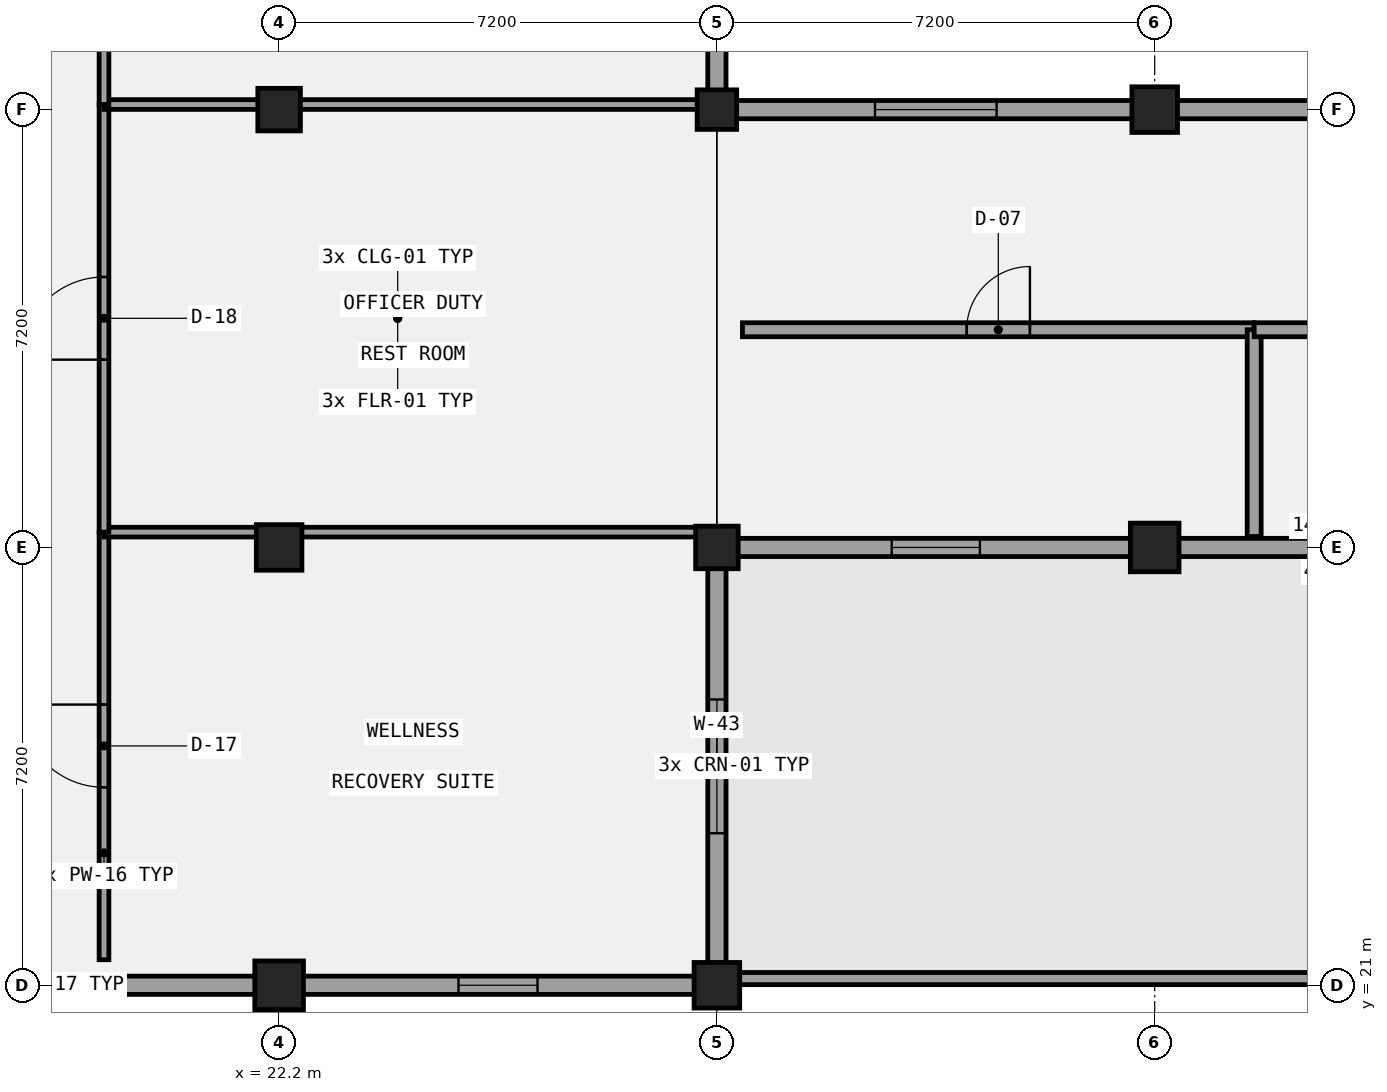
"""IFC4 building model, lengths in metres.
Left out: names, types, materials, properties, quantities, classifications, styles, units other than length and angle.
Written with IfcOpenShell. Run it as: python <this file> out.ifc"""

import sys

from ifc_helpers import new_model, si_unit, direction, frame, frame_2d, origin, origin_2d, place, context, subcontext, project, spatial, rectangle, circle, extrude, element, fill, save


model = new_model("IFC4")
c1 = context("Model", 3, precision=1e-05, world=origin(), true_north=direction((0.0, 1.0)))
c2 = subcontext(c1, "Body", "Model", "MODEL_VIEW")
j1 = project(units=[si_unit("LENGTHUNIT", "METRE"), si_unit("PLANEANGLEUNIT", "RADIAN")], contexts=[c1])
p1 = place(None, origin())
s1 = spatial("IfcSite", under=j1, at=p1, CompositionType="ELEMENT")
p2 = place(p1, origin())
s2 = spatial("IfcBuilding", under=s1, at=p2, CompositionType="ELEMENT")
p3 = place(p2, frame((0.0, 0.0, 5.4)))
s3 = spatial("IfcBuildingStorey", under=s2, at=p3, CompositionType="ELEMENT", Elevation=5.4)
p4 = place(p3, frame((22.2, 21.0, 0.0), z_axis=(0.0, 0.0, 1.0), x_axis=(1.0, 0.0, 0.0)))
e1 = element("IfcColumn", 1, at=p4, inside=s3, PredefinedType="COLUMN", context=c2, shape_type="SweptSolid", body=[
    extrude(rectangle(XDim=0.8, YDim=0.8, at=origin_2d()), origin(), (0.0, 0.0, 1.0), 4.2),
])
p5 = place(p3, frame((22.2, 28.2, 0.0), z_axis=(0.0, 0.0, 1.0), x_axis=(1.0, 0.0, 0.0)))
e2 = element("IfcColumn", 2, at=p5, inside=s3, PredefinedType="COLUMN", context=c2, shape_type="SweptSolid", body=[
    extrude(rectangle(XDim=0.75, YDim=0.75, at=origin_2d()), origin(), (0.0, 0.0, 1.0), 4.2),
])
p6 = place(p3, frame((22.2, 35.4, 0.0), z_axis=(0.0, 0.0, 1.0), x_axis=(1.0, 0.0, 0.0)))
e3 = element("IfcColumn", 3, at=p6, inside=s3, PredefinedType="COLUMN", context=c2, shape_type="SweptSolid", body=[
    extrude(rectangle(XDim=0.7, YDim=0.7, at=origin_2d()), origin(), (0.0, 0.0, 1.0), 4.2),
])
p7 = place(p3, frame((29.4, 21.0, 0.0), z_axis=(0.0, 0.0, 1.0), x_axis=(1.0, 0.0, 0.0)))
e4 = element("IfcColumn", 4, at=p7, inside=s3, PredefinedType="COLUMN", context=c2, shape_type="SweptSolid", body=[
    extrude(rectangle(XDim=0.75, YDim=0.75, at=origin_2d()), origin(), (0.0, 0.0, 1.0), 4.2),
])
p8 = place(p3, frame((29.4, 28.2, 0.0), z_axis=(0.0, 0.0, 1.0), x_axis=(1.0, 0.0, 0.0)))
e5 = element("IfcColumn", 5, at=p8, inside=s3, PredefinedType="COLUMN", context=c2, shape_type="SweptSolid", body=[
    extrude(rectangle(XDim=0.7, YDim=0.7, at=origin_2d()), origin(), (0.0, 0.0, 1.0), 4.2),
])
p9 = place(p3, frame((29.4, 35.4, 0.0), z_axis=(0.0, 0.0, 1.0), x_axis=(1.0, 0.0, 0.0)))
e6 = element("IfcColumn", 6, at=p9, inside=s3, PredefinedType="COLUMN", context=c2, shape_type="SweptSolid", body=[
    extrude(circle(Radius=0.325, at=origin_2d()), origin(), (0.0, 0.0, 1.0), 4.2),
])
p10 = place(p3, frame((36.6, 28.2, 0.0), z_axis=(0.0, 0.0, 1.0), x_axis=(1.0, 0.0, 0.0)))
e7 = element("IfcColumn", 7, at=p10, inside=s3, PredefinedType="COLUMN", context=c2, shape_type="SweptSolid", body=[
    extrude(rectangle(XDim=0.8, YDim=0.8, at=origin_2d()), origin(), (0.0, 0.0, 1.0), 4.2),
])
p11 = place(p3, frame((36.6, 35.4, 0.0), z_axis=(0.0, 0.0, 1.0), x_axis=(1.0, 0.0, 0.0)))
e8 = element("IfcColumn", 8, at=p11, inside=s3, PredefinedType="COLUMN", context=c2, shape_type="SweptSolid", body=[
    extrude(rectangle(XDim=0.75, YDim=0.75, at=origin_2d()), origin(), (0.0, 0.0, 1.0), 4.2),
])
p12 = place(p3, frame((7.65, 21.0, 0.0), z_axis=(0.0, 0.0, 1.0), x_axis=(1.0, 0.0, 0.0)))
e9 = element("IfcWall", 9, at=p12, inside=s3, PredefinedType="SOLIDWALL", context=c2, shape_type="SweptSolid", body=[
    extrude(rectangle(XDim=21.9, YDim=0.3, at=frame_2d((10.95, 0.0))), origin(), (0.0, 0.0, 1.0), 2.92),
])
p13 = place(p12, frame((3.1, 0.0, 1.0)))
e10 = element("IfcOpeningElement", 10, at=p13, cuts=e9, PredefinedType="OPENING", context=c2, shape_type="SweptSolid", body=[
    extrude(rectangle(XDim=1.3, YDim=1.65, at=frame_2d((0.65, 0.825))), frame((0.0, 0.16, 0.0), z_axis=(0.0, -1.0, 0.0), x_axis=(1.0, 0.0, 0.0)), (0.0, 0.0, 1.0), 0.32),
])
p14 = place(p12, frame((10.3, 0.0, 1.0)))
e11 = element("IfcOpeningElement", 11, at=p14, cuts=e9, PredefinedType="OPENING", context=c2, shape_type="SweptSolid", body=[
    extrude(rectangle(XDim=1.3, YDim=1.65, at=frame_2d((0.65, 0.825))), frame((0.0, 0.16, 0.0), z_axis=(0.0, -1.0, 0.0), x_axis=(1.0, 0.0, 0.0)), (0.0, 0.0, 1.0), 0.32),
])
p15 = place(p12, frame((17.5, 0.0, 1.0)))
e12 = element("IfcOpeningElement", 12, at=p15, cuts=e9, PredefinedType="OPENING", context=c2, shape_type="SweptSolid", body=[
    extrude(rectangle(XDim=1.3, YDim=1.65, at=frame_2d((0.65, 0.825))), frame((0.0, 0.16, 0.0), z_axis=(0.0, -1.0, 0.0), x_axis=(1.0, 0.0, 0.0)), (0.0, 0.0, 1.0), 0.32),
])
p16 = place(p3, frame((29.4, 21.15, 0.0), z_axis=(0.0, 0.0, 1.0), x_axis=(0.0, 1.0, 0.0)))
e13 = element("IfcWall", 13, at=p16, inside=s3, PredefinedType="SOLIDWALL", context=c2, shape_type="SweptSolid", body=[
    extrude(rectangle(XDim=6.9, YDim=0.3, at=frame_2d((3.45, 0.0))), origin(), (0.0, 0.0, 1.0), 3.22),
])
p17 = place(p16, frame((2.35, 0.0, 1.0)))
e14 = element("IfcOpeningElement", 14, at=p17, cuts=e13, PredefinedType="OPENING", context=c2, shape_type="SweptSolid", body=[
    extrude(rectangle(XDim=2.2, YDim=1.9, at=frame_2d((1.1, 0.95))), frame((0.0, 0.16, 0.0), z_axis=(0.0, -1.0, 0.0), x_axis=(1.0, 0.0, 0.0)), (0.0, 0.0, 1.0), 0.32),
])
p18 = place(p3, frame((29.25, 28.2, 0.0), z_axis=(0.0, 0.0, 1.0), x_axis=(1.0, 0.0, 0.0)))
e15 = element("IfcWall", 15, at=p18, inside=s3, PredefinedType="SOLIDWALL", context=c2, shape_type="SweptSolid", body=[
    extrude(rectangle(XDim=50.3, YDim=0.3, at=frame_2d((25.15, 0.0))), origin(), (0.0, 0.0, 1.0), 2.92),
])
p19 = place(p18, frame((3.025, 0.0, 1.0)))
e16 = element("IfcOpeningElement", 16, at=p19, cuts=e15, PredefinedType="OPENING", context=c2, shape_type="SweptSolid", body=[
    extrude(rectangle(XDim=1.45, YDim=1.65, at=frame_2d((0.725, 0.825))), frame((0.0, 0.16, 0.0), z_axis=(0.0, -1.0, 0.0), x_axis=(1.0, 0.0, 0.0)), (0.0, 0.0, 1.0), 0.32),
])
p20 = place(p18, frame((10.225, 0.0, 1.0)))
e17 = element("IfcOpeningElement", 17, at=p20, cuts=e15, PredefinedType="OPENING", context=c2, shape_type="SweptSolid", body=[
    extrude(rectangle(XDim=1.45, YDim=1.65, at=frame_2d((0.725, 0.825))), frame((0.0, 0.16, 0.0), z_axis=(0.0, -1.0, 0.0), x_axis=(1.0, 0.0, 0.0)), (0.0, 0.0, 1.0), 0.32),
])
p21 = place(p18, frame((17.425, 0.0, 1.0)))
e18 = element("IfcOpeningElement", 18, at=p21, cuts=e15, PredefinedType="OPENING", context=c2, shape_type="SweptSolid", body=[
    extrude(rectangle(XDim=1.45, YDim=1.65, at=frame_2d((0.725, 0.825))), frame((0.0, 0.16, 0.0), z_axis=(0.0, -1.0, 0.0), x_axis=(1.0, 0.0, 0.0)), (0.0, 0.0, 1.0), 0.32),
])
p22 = place(p18, frame((24.625, 0.0, 1.0)))
e19 = element("IfcOpeningElement", 19, at=p22, cuts=e15, PredefinedType="OPENING", context=c2, shape_type="SweptSolid", body=[
    extrude(rectangle(XDim=1.45, YDim=1.65, at=frame_2d((0.725, 0.825))), frame((0.0, 0.16, 0.0), z_axis=(0.0, -1.0, 0.0), x_axis=(1.0, 0.0, 0.0)), (0.0, 0.0, 1.0), 0.32),
])
p23 = place(p18, frame((31.825, 0.0, 1.0)))
e20 = element("IfcOpeningElement", 20, at=p23, cuts=e15, PredefinedType="OPENING", context=c2, shape_type="SweptSolid", body=[
    extrude(rectangle(XDim=1.45, YDim=1.65, at=frame_2d((0.725, 0.825))), frame((0.0, 0.16, 0.0), z_axis=(0.0, -1.0, 0.0), x_axis=(1.0, 0.0, 0.0)), (0.0, 0.0, 1.0), 0.32),
])
p24 = place(p18, frame((39.025, 0.0, 1.0)))
e21 = element("IfcOpeningElement", 21, at=p24, cuts=e15, PredefinedType="OPENING", context=c2, shape_type="SweptSolid", body=[
    extrude(rectangle(XDim=1.45, YDim=1.65, at=frame_2d((0.725, 0.825))), frame((0.0, 0.16, 0.0), z_axis=(0.0, -1.0, 0.0), x_axis=(1.0, 0.0, 0.0)), (0.0, 0.0, 1.0), 0.32),
])
p25 = place(p18, frame((46.1, 0.0, 1.0)))
e22 = element("IfcOpeningElement", 22, at=p25, cuts=e15, PredefinedType="OPENING", context=c2, shape_type="SweptSolid", body=[
    extrude(rectangle(XDim=1.45, YDim=1.65, at=frame_2d((0.725, 0.825))), frame((0.0, 0.16, 0.0), z_axis=(0.0, -1.0, 0.0), x_axis=(1.0, 0.0, 0.0)), (0.0, 0.0, 1.0), 0.32),
])
p26 = place(p3, frame((29.4, 35.55, 0.0), z_axis=(0.0, 0.0, 1.0), x_axis=(0.0, 1.0, 0.0)))
e23 = element("IfcWall", 23, at=p26, inside=s3, PredefinedType="SOLIDWALL", context=c2, shape_type="SweptSolid", body=[
    extrude(rectangle(XDim=21.3, YDim=0.3, at=frame_2d((10.65, 0.0))), origin(), (0.0, 0.0, 1.0), 2.92),
])
p27 = place(p26, frame((2.725, 0.0, 1.0)))
e24 = element("IfcOpeningElement", 24, at=p27, cuts=e23, PredefinedType="OPENING", context=c2, shape_type="SweptSolid", body=[
    extrude(rectangle(XDim=1.6, YDim=1.4, at=frame_2d((0.8, 0.7))), frame((0.0, 0.16, 0.0), z_axis=(0.0, -1.0, 0.0), x_axis=(1.0, 0.0, 0.0)), (0.0, 0.0, 1.0), 0.32),
])
p28 = place(p26, frame((9.85, 0.0, 1.0)))
e25 = element("IfcOpeningElement", 25, at=p28, cuts=e23, PredefinedType="OPENING", context=c2, shape_type="SweptSolid", body=[
    extrude(rectangle(XDim=1.6, YDim=1.4, at=frame_2d((0.8, 0.7))), frame((0.0, 0.16, 0.0), z_axis=(0.0, -1.0, 0.0), x_axis=(1.0, 0.0, 0.0)), (0.0, 0.0, 1.0), 0.32),
])
p29 = place(p26, frame((16.975, 0.0, 1.0)))
e26 = element("IfcOpeningElement", 26, at=p29, cuts=e23, PredefinedType="OPENING", context=c2, shape_type="SweptSolid", body=[
    extrude(rectangle(XDim=1.6, YDim=1.4, at=frame_2d((0.8, 0.7))), frame((0.0, 0.16, 0.0), z_axis=(0.0, -1.0, 0.0), x_axis=(1.0, 0.0, 0.0)), (0.0, 0.0, 1.0), 0.32),
])
p30 = place(p3, frame((72.75, 35.4, 0.0), z_axis=(0.0, 0.0, 1.0), x_axis=(-1.0, 0.0, 0.0)))
e27 = element("IfcWall", 27, at=p30, inside=s3, PredefinedType="SOLIDWALL", context=c2, shape_type="SweptSolid", body=[
    extrude(rectangle(XDim=43.5, YDim=0.3, at=frame_2d((21.75, 0.0))), origin(), (0.0, 0.0, 1.0), 2.92),
])
p31 = place(p30, frame((38.75, 0.0, 1.0)))
e28 = element("IfcOpeningElement", 28, at=p31, cuts=e27, PredefinedType="OPENING", context=c2, shape_type="SweptSolid", body=[
    extrude(rectangle(XDim=2.0, YDim=1.4, at=frame_2d((1.0, 0.7))), frame((0.0, 0.16, 0.0), z_axis=(0.0, -1.0, 0.0), x_axis=(1.0, 0.0, 0.0)), (0.0, 0.0, 1.0), 0.32),
])
p32 = place(p30, frame((31.55, 0.0, 1.0)))
e29 = element("IfcOpeningElement", 29, at=p32, cuts=e27, PredefinedType="OPENING", context=c2, shape_type="SweptSolid", body=[
    extrude(rectangle(XDim=2.0, YDim=1.4, at=frame_2d((1.0, 0.7))), frame((0.0, 0.16, 0.0), z_axis=(0.0, -1.0, 0.0), x_axis=(1.0, 0.0, 0.0)), (0.0, 0.0, 1.0), 0.32),
])
p33 = place(p30, frame((24.35, 0.0, 1.0)))
e30 = element("IfcOpeningElement", 30, at=p33, cuts=e27, PredefinedType="OPENING", context=c2, shape_type="SweptSolid", body=[
    extrude(rectangle(XDim=2.0, YDim=1.4, at=frame_2d((1.0, 0.7))), frame((0.0, 0.16, 0.0), z_axis=(0.0, -1.0, 0.0), x_axis=(1.0, 0.0, 0.0)), (0.0, 0.0, 1.0), 0.32),
])
p34 = place(p30, frame((17.15, 0.0, 1.0)))
e31 = element("IfcOpeningElement", 31, at=p34, cuts=e27, PredefinedType="OPENING", context=c2, shape_type="SweptSolid", body=[
    extrude(rectangle(XDim=2.0, YDim=1.4, at=frame_2d((1.0, 0.7))), frame((0.0, 0.16, 0.0), z_axis=(0.0, -1.0, 0.0), x_axis=(1.0, 0.0, 0.0)), (0.0, 0.0, 1.0), 0.32),
])
p35 = place(p30, frame((9.95, 0.0, 1.0)))
e32 = element("IfcOpeningElement", 32, at=p35, cuts=e27, PredefinedType="OPENING", context=c2, shape_type="SweptSolid", body=[
    extrude(rectangle(XDim=2.0, YDim=1.4, at=frame_2d((1.0, 0.7))), frame((0.0, 0.16, 0.0), z_axis=(0.0, -1.0, 0.0), x_axis=(1.0, 0.0, 0.0)), (0.0, 0.0, 1.0), 0.32),
])
p36 = place(p30, frame((2.75, 0.0, 1.0)))
e33 = element("IfcOpeningElement", 33, at=p36, cuts=e27, PredefinedType="OPENING", context=c2, shape_type="SweptSolid", body=[
    extrude(rectangle(XDim=2.0, YDim=1.4, at=frame_2d((1.0, 0.7))), frame((0.0, 0.16, 0.0), z_axis=(0.0, -1.0, 0.0), x_axis=(1.0, 0.0, 0.0)), (0.0, 0.0, 1.0), 0.32),
])
p37 = place(p3, frame((79.58, 21.11, 0.0), z_axis=(0.0, 0.0, 1.0), x_axis=(-1.0, 0.0, 0.0)))
e34 = element("IfcWall", 34, at=p37, inside=s3, PredefinedType="PARAPET", context=c2, shape_type="SweptSolid", body=[
    extrude(rectangle(XDim=49.96, YDim=0.2, at=frame_2d((24.98, 0.0))), origin(), (0.0, 0.0, 1.0), 1.12),
])
p38 = place(p3, frame((19.32, 21.42, 0.0), z_axis=(0.0, 0.0, 1.0), x_axis=(0.0, 1.0, 0.0)))
e35 = element("IfcWall", 35, at=p38, inside=s3, PredefinedType="PARTITIONING", context=c2, shape_type="SweptSolid", body=[
    extrude(rectangle(XDim=7.032, YDim=0.16, at=frame_2d((3.516, 0.0))), origin(), (0.0, 0.0, 1.0), 3.92),
])
p39 = place(p38, frame((2.836, 0.0, 0.0)))
e36 = element("IfcOpeningElement", 36, at=p39, cuts=e35, PredefinedType="OPENING", context=c2, shape_type="SweptSolid", body=[
    extrude(rectangle(XDim=1.36, YDim=2.22, at=frame_2d((0.68, 1.11))), frame((0.0, 0.09, 0.0), z_axis=(0.0, -1.0, 0.0), x_axis=(1.0, 0.0, 0.0)), (0.0, 0.0, 1.0), 0.18),
])
p40 = place(p3, frame((19.32, 28.452, 0.0), z_axis=(0.0, 0.0, 1.0), x_axis=(1.0, 0.0, 0.0)))
e37 = element("IfcWall", 37, at=p40, inside=s3, PredefinedType="PARTITIONING", context=c2, shape_type="SweptSolid", body=[
    extrude(rectangle(XDim=9.9, YDim=0.16, at=frame_2d((4.95, 0.0))), origin(), (0.0, 0.0, 1.0), 2.72),
])
p41 = place(p3, frame((19.32, 28.452, 0.0), z_axis=(0.0, 0.0, 1.0), x_axis=(0.0, 1.0, 0.0)))
e38 = element("IfcWall", 38, at=p41, inside=s3, PredefinedType="PARTITIONING", context=c2, shape_type="SweptSolid", body=[
    extrude(rectangle(XDim=7.032, YDim=0.16, at=frame_2d((3.516, 0.0))), origin(), (0.0, 0.0, 1.0), 3.92),
])
p42 = place(p41, frame((2.836, 0.0, 0.0)))
e39 = element("IfcOpeningElement", 39, at=p42, cuts=e38, PredefinedType="OPENING", context=c2, shape_type="SweptSolid", body=[
    extrude(rectangle(XDim=1.36, YDim=2.35, at=frame_2d((0.68, 1.175))), frame((0.0, 0.09, 0.0), z_axis=(0.0, -1.0, 0.0), x_axis=(1.0, 0.0, 0.0)), (0.0, 0.0, 1.0), 0.18),
])
p43 = place(p3, frame((19.32, 35.484, 0.0), z_axis=(0.0, 0.0, 1.0), x_axis=(1.0, 0.0, 0.0)))
e40 = element("IfcWall", 40, at=p43, inside=s3, PredefinedType="PARTITIONING", context=c2, shape_type="SweptSolid", body=[
    extrude(rectangle(XDim=9.9, YDim=0.16, at=frame_2d((4.95, 0.0))), origin(), (0.0, 0.0, 1.0), 2.72),
])
p44 = place(p3, frame((19.32, 35.484, 0.0), z_axis=(0.0, 0.0, 1.0), x_axis=(0.0, 1.0, 0.0)))
e41 = element("IfcWall", 41, at=p44, inside=s3, PredefinedType="PARTITIONING", context=c2, shape_type="SweptSolid", body=[
    extrude(rectangle(XDim=7.032, YDim=0.16, at=frame_2d((3.516, 0.0))), origin(), (0.0, 0.0, 1.0), 3.92),
])
p45 = place(p44, frame((2.756, 0.0, 0.0)))
e42 = element("IfcOpeningElement", 42, at=p45, cuts=e41, PredefinedType="OPENING", context=c2, shape_type="SweptSolid", body=[
    extrude(rectangle(XDim=1.52, YDim=2.1, at=frame_2d((0.76, 1.05))), frame((0.0, 0.09, 0.0), z_axis=(0.0, -1.0, 0.0), x_axis=(1.0, 0.0, 0.0)), (0.0, 0.0, 1.0), 0.18),
])
p46 = place(p3, frame((29.82, 31.78, 0.0), z_axis=(0.0, 0.0, 1.0), x_axis=(1.0, 0.0, 0.0)))
e43 = element("IfcWall", 43, at=p46, inside=s3, PredefinedType="PARTITIONING", context=c2, shape_type="SweptSolid", body=[
    extrude(rectangle(XDim=8.416, YDim=0.23, at=frame_2d((4.208, 0.0))), origin(), (0.0, 0.0, 1.0), 3.37),
])
p47 = place(p46, frame((3.688, 0.0, 0.0)))
e44 = element("IfcOpeningElement", 44, at=p47, cuts=e43, PredefinedType="OPENING", context=c2, shape_type="SweptSolid", body=[
    extrude(rectangle(XDim=1.04, YDim=2.1, at=frame_2d((0.52, 1.05))), frame((0.0, 0.125, 0.0), z_axis=(0.0, -1.0, 0.0), x_axis=(1.0, 0.0, 0.0)), (0.0, 0.0, 1.0), 0.25),
])
p48 = place(p3, frame((38.236, 28.38, 0.0), z_axis=(0.0, 0.0, 1.0), x_axis=(0.0, 1.0, 0.0)))
e45 = element("IfcWall", 45, at=p48, inside=s3, PredefinedType="PARTITIONING", context=c2, shape_type="SweptSolid", body=[
    extrude(rectangle(XDim=3.4, YDim=0.23, at=frame_2d((1.7, 0.0))), origin(), (0.0, 0.0, 1.0), 3.92),
])
p49 = place(p3, frame((38.236, 31.78, 0.0), z_axis=(0.0, 0.0, 1.0), x_axis=(1.0, 0.0, 0.0)))
e46 = element("IfcWall", 46, at=p49, inside=s3, PredefinedType="PARTITIONING", context=c2, shape_type="SweptSolid", body=[
    extrude(rectangle(XDim=11.316, YDim=0.23, at=frame_2d((5.658, 0.0))), origin(), (0.0, 0.0, 1.0), 3.37),
])
p50 = place(p49, frame((5.138, 0.0, 0.0)))
e47 = element("IfcOpeningElement", 47, at=p50, cuts=e46, PredefinedType="OPENING", context=c2, shape_type="SweptSolid", body=[
    extrude(rectangle(XDim=1.04, YDim=2.22, at=frame_2d((0.52, 1.11))), frame((0.0, 0.125, 0.0), z_axis=(0.0, -1.0, 0.0), x_axis=(1.0, 0.0, 0.0)), (0.0, 0.0, 1.0), 0.25),
])
p51 = place(p14, origin())
e48 = element("IfcWindow", 48, at=p51, inside=s3, PartitioningType="SINGLE_PANEL", PredefinedType="WINDOW", context=c2, shape_type="SweptSolid", body=[
    extrude(rectangle(XDim=1.3, YDim=1.65, at=frame_2d((0.65, 0.825))), frame((0.0, 0.03, 0.0), z_axis=(0.0, -1.0, 0.0), x_axis=(1.0, 0.0, 0.0)), (0.0, 0.0, 1.0), 0.06),
])
fill(e11, e48)
p52 = place(p15, origin())
e49 = element("IfcWindow", 49, at=p52, inside=s3, PartitioningType="SINGLE_PANEL", PredefinedType="WINDOW", context=c2, shape_type="SweptSolid", body=[
    extrude(rectangle(XDim=1.3, YDim=1.65, at=frame_2d((0.65, 0.825))), frame((0.0, 0.03, 0.0), z_axis=(0.0, -1.0, 0.0), x_axis=(1.0, 0.0, 0.0)), (0.0, 0.0, 1.0), 0.06),
])
fill(e12, e49)
p53 = place(p17, origin())
e50 = element("IfcWindow", 50, at=p53, inside=s3, PartitioningType="SINGLE_PANEL", PredefinedType="WINDOW", context=c2, shape_type="SweptSolid", body=[
    extrude(rectangle(XDim=2.2, YDim=1.9, at=frame_2d((1.1, 0.95))), frame((0.0, 0.03, 0.0), z_axis=(0.0, -1.0, 0.0), x_axis=(1.0, 0.0, 0.0)), (0.0, 0.0, 1.0), 0.06),
])
fill(e14, e50)
p54 = place(p19, origin())
e51 = element("IfcWindow", 51, at=p54, inside=s3, PartitioningType="SINGLE_PANEL", PredefinedType="WINDOW", context=c2, shape_type="SweptSolid", body=[
    extrude(rectangle(XDim=1.45, YDim=1.65, at=frame_2d((0.725, 0.825))), frame((0.0, 0.03, 0.0), z_axis=(0.0, -1.0, 0.0), x_axis=(1.0, 0.0, 0.0)), (0.0, 0.0, 1.0), 0.06),
])
fill(e16, e51)
p55 = place(p31, origin())
e52 = element("IfcWindow", 52, at=p55, inside=s3, PartitioningType="SINGLE_PANEL", PredefinedType="WINDOW", context=c2, shape_type="SweptSolid", body=[
    extrude(rectangle(XDim=2.0, YDim=1.4, at=frame_2d((1.0, 0.7))), frame((0.0, 0.03, 0.0), z_axis=(0.0, -1.0, 0.0), x_axis=(1.0, 0.0, 0.0)), (0.0, 0.0, 1.0), 0.06),
])
fill(e28, e52)
p56 = place(p39, origin())
e53 = element("IfcDoor", 53, at=p56, inside=s3, OperationType="SINGLE_SWING_RIGHT", PredefinedType="DOOR", context=c2, shape_type="SweptSolid", body=[
    extrude(rectangle(XDim=1.36, YDim=2.22, at=frame_2d((0.68, 1.11))), frame((0.0, 0.025, 0.0), z_axis=(0.0, -1.0, 0.0), x_axis=(1.0, 0.0, 0.0)), (0.0, 0.0, 1.0), 0.05),
])
fill(e36, e53)
p57 = place(p42, origin())
e54 = element("IfcDoor", 54, at=p57, inside=s3, OperationType="SINGLE_SWING_LEFT", PredefinedType="DOOR", context=c2, shape_type="SweptSolid", body=[
    extrude(rectangle(XDim=1.36, YDim=2.35, at=frame_2d((0.68, 1.175))), frame((0.0, 0.025, 0.0), z_axis=(0.0, -1.0, 0.0), x_axis=(1.0, 0.0, 0.0)), (0.0, 0.0, 1.0), 0.05),
])
fill(e39, e54)
p58 = place(p47, frame((1.04, 0.0, 0.0), z_axis=(0.0, 0.0, 1.0), x_axis=(-1.0, 0.0, 0.0)))
e55 = element("IfcDoor", 55, at=p58, inside=s3, OperationType="SINGLE_SWING_RIGHT", PredefinedType="DOOR", context=c2, shape_type="SweptSolid", body=[
    extrude(rectangle(XDim=1.04, YDim=2.1, at=frame_2d((0.52, 1.05))), frame((0.0, 0.025, 0.0), z_axis=(0.0, -1.0, 0.0), x_axis=(1.0, 0.0, 0.0)), (0.0, 0.0, 1.0), 0.05),
])
fill(e44, e55)
save(model, sys.argv[1])
